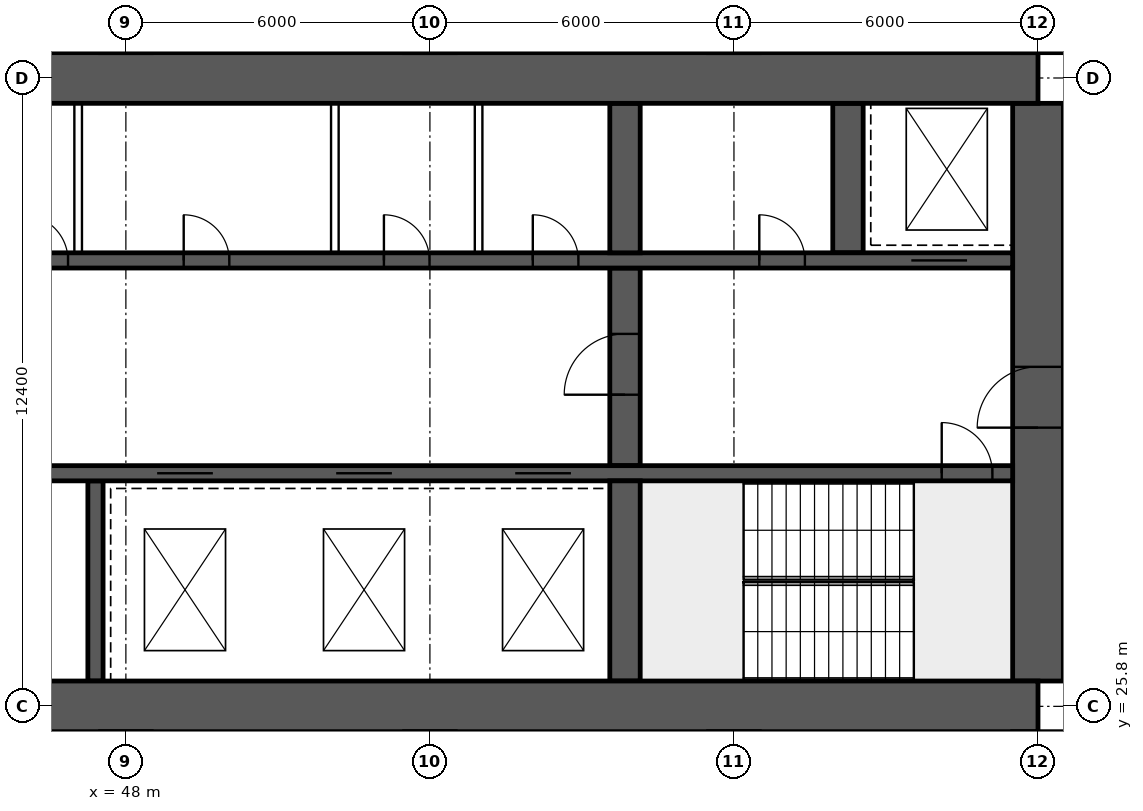
"""IFC4 building model, lengths in metres.
Left out: names, types, materials, properties, quantities, classifications, styles, units other than length and angle.
Written with IfcOpenShell. Run it as: python <this file> out.ifc"""

import sys

from ifc_helpers import new_model, si_unit, direction, frame, frame_2d, origin, place, context, subcontext, project, spatial, rectangle, extrude, element, fill, save


model = new_model("IFC4")
c1 = context("Model", 3, precision=1e-05, world=origin(), true_north=direction((0.0, 1.0)))
c2 = subcontext(c1, "Body", "Model", "MODEL_VIEW")
j1 = project(units=[si_unit("LENGTHUNIT", "METRE"), si_unit("PLANEANGLEUNIT", "RADIAN")], contexts=[c1])
p1 = place(None, origin())
s1 = spatial("IfcSite", under=j1, at=p1, CompositionType="ELEMENT")
p2 = place(p1, origin())
s2 = spatial("IfcBuilding", under=s1, at=p2, CompositionType="ELEMENT")
p3 = place(p2, frame((0.0, 0.0, -9.0)))
s3 = spatial("IfcBuildingStorey", under=s2, at=p3, CompositionType="ELEMENT", Elevation=-9.0)
for number, where, z_axis, x_axis in (
    (1, (18.0, 25.8, 0.0), (0.0, 0.0, 1.0), (1.0, 0.0, 0.0)),
    (2, (18.0, 38.2, 0.0), (0.0, 0.0, 1.0), (1.0, 0.0, 0.0)),
):
    element("IfcWall", number, at=place(p3, frame(where, z_axis=z_axis, x_axis=x_axis)), inside=s3, PredefinedType="SHEAR", context=c2, shape_type="SweptSolid", body=[
        extrude(rectangle(XDim=48.0, YDim=1.0, at=frame_2d((24.0, 0.0))), origin(), (0.0, 0.0, 1.0), 4.5),
    ])
p4 = place(p3, frame((66.0, 26.3, 0.0), z_axis=(0.0, 0.0, 1.0), x_axis=(0.0, 1.0, 0.0)))
e3 = element("IfcWall", 3, at=p4, inside=s3, PredefinedType="SHEAR", context=c2, shape_type="SweptSolid", body=[
    extrude(rectangle(XDim=11.4, YDim=1.0, at=frame_2d((5.7, 0.0))), origin(), (0.0, 0.0, 1.0), 4.5),
])
p5 = place(p4, frame((5.0, 0.0, 0.0)))
e4 = element("IfcOpeningElement", 4, at=p5, cuts=e3, PredefinedType="OPENING", context=c2, shape_type="SweptSolid", body=[
    extrude(rectangle(XDim=1.2, YDim=2.1, at=frame_2d((0.6, 1.05))), frame((0.0, 0.51, 0.0), z_axis=(0.0, -1.0, 0.0), x_axis=(1.0, 0.0, 0.0)), (0.0, 0.0, 1.0), 1.02),
])
p6 = place(p3, frame((18.5, 30.4, 0.0), z_axis=(0.0, 0.0, 1.0), x_axis=(1.0, 0.0, 0.0)))
e5 = element("IfcWall", 5, at=p6, inside=s3, PredefinedType="SHEAR", context=c2, shape_type="SweptSolid", body=[
    extrude(rectangle(XDim=47.0, YDim=0.3, at=frame_2d((23.5, 0.0))), origin(), (0.0, 0.0, 1.0), 4.5),
])
p7 = place(p6, frame((0.4, 0.0, 0.0)))
e6 = element("IfcOpeningElement", 6, at=p7, cuts=e5, PredefinedType="OPENING", context=c2, shape_type="SweptSolid", body=[
    extrude(rectangle(XDim=1.0, YDim=2.1, at=frame_2d((0.5, 1.05))), frame((0.0, 0.16, 0.0), z_axis=(0.0, -1.0, 0.0), x_axis=(1.0, 0.0, 0.0)), (0.0, 0.0, 1.0), 0.32),
])
p8 = place(p6, frame((45.6, 0.0, 0.0)))
e7 = element("IfcOpeningElement", 7, at=p8, cuts=e5, PredefinedType="OPENING", context=c2, shape_type="SweptSolid", body=[
    extrude(rectangle(XDim=1.0, YDim=2.1, at=frame_2d((0.5, 1.05))), frame((0.0, 0.16, 0.0), z_axis=(0.0, -1.0, 0.0), x_axis=(1.0, 0.0, 0.0)), (0.0, 0.0, 1.0), 0.32),
])
p9 = place(p6, frame((8.35, 0.0, 0.0)))
e8 = element("IfcOpeningElement", 8, at=p9, cuts=e5, PredefinedType="OPENING", context=c2, shape_type="SweptSolid", body=[
    extrude(rectangle(XDim=0.9, YDim=2.1, at=frame_2d((0.45, 1.05))), frame((0.0, 0.16, 0.0), z_axis=(0.0, -1.0, 0.0), x_axis=(1.0, 0.0, 0.0)), (0.0, 0.0, 1.0), 0.32),
])
p10 = place(p6, frame((13.55, 0.0, 0.0)))
e9 = element("IfcOpeningElement", 9, at=p10, cuts=e5, PredefinedType="OPENING", context=c2, shape_type="SweptSolid", body=[
    extrude(rectangle(XDim=0.9, YDim=2.1, at=frame_2d((0.45, 1.05))), frame((0.0, 0.16, 0.0), z_axis=(0.0, -1.0, 0.0), x_axis=(1.0, 0.0, 0.0)), (0.0, 0.0, 1.0), 0.32),
])
p11 = place(p6, frame((18.825, 0.0, 0.0)))
e10 = element("IfcOpeningElement", 10, at=p11, cuts=e5, PredefinedType="OPENING", context=c2, shape_type="SweptSolid", body=[
    extrude(rectangle(XDim=0.9, YDim=2.1, at=frame_2d((0.45, 1.05))), frame((0.0, 0.16, 0.0), z_axis=(0.0, -1.0, 0.0), x_axis=(1.0, 0.0, 0.0)), (0.0, 0.0, 1.0), 0.32),
])
p12 = place(p6, frame((24.325, 0.0, 0.0)))
e11 = element("IfcOpeningElement", 11, at=p12, cuts=e5, PredefinedType="OPENING", context=c2, shape_type="SweptSolid", body=[
    extrude(rectangle(XDim=0.9, YDim=2.1, at=frame_2d((0.45, 1.05))), frame((0.0, 0.16, 0.0), z_axis=(0.0, -1.0, 0.0), x_axis=(1.0, 0.0, 0.0)), (0.0, 0.0, 1.0), 0.32),
])
p13 = place(p6, frame((30.117, 0.0, 0.0)))
e12 = element("IfcOpeningElement", 12, at=p13, cuts=e5, PredefinedType="OPENING", context=c2, shape_type="SweptSolid", body=[
    extrude(rectangle(XDim=1.1, YDim=2.1, at=frame_2d((0.55, 1.05))), frame((0.0, 0.16, 0.0), z_axis=(0.0, -1.0, 0.0), x_axis=(1.0, 0.0, 0.0)), (0.0, 0.0, 1.0), 0.32),
])
p14 = place(p6, frame((33.65, 0.0, 0.0)))
e13 = element("IfcOpeningElement", 13, at=p14, cuts=e5, PredefinedType="OPENING", context=c2, shape_type="SweptSolid", body=[
    extrude(rectangle(XDim=1.1, YDim=2.1, at=frame_2d((0.55, 1.05))), frame((0.0, 0.16, 0.0), z_axis=(0.0, -1.0, 0.0), x_axis=(1.0, 0.0, 0.0)), (0.0, 0.0, 1.0), 0.32),
])
p15 = place(p6, frame((37.183, 0.0, 0.0)))
e14 = element("IfcOpeningElement", 14, at=p15, cuts=e5, PredefinedType="OPENING", context=c2, shape_type="SweptSolid", body=[
    extrude(rectangle(XDim=1.1, YDim=2.1, at=frame_2d((0.55, 1.05))), frame((0.0, 0.16, 0.0), z_axis=(0.0, -1.0, 0.0), x_axis=(1.0, 0.0, 0.0)), (0.0, 0.0, 1.0), 0.32),
])
p16 = place(p3, frame((18.5, 34.6, 0.0), z_axis=(0.0, 0.0, 1.0), x_axis=(1.0, 0.0, 0.0)))
e15 = element("IfcWall", 15, at=p16, inside=s3, PredefinedType="SHEAR", context=c2, shape_type="SweptSolid", body=[
    extrude(rectangle(XDim=47.0, YDim=0.3, at=frame_2d((23.5, 0.0))), origin(), (0.0, 0.0, 1.0), 4.5),
])
p17 = place(p16, frame((0.9, 0.0, 0.0)))
e16 = element("IfcOpeningElement", 16, at=p17, cuts=e15, PredefinedType="OPENING", context=c2, shape_type="SweptSolid", body=[
    extrude(rectangle(XDim=1.1, YDim=2.1, at=frame_2d((0.55, 1.05))), frame((0.0, 0.16, 0.0), z_axis=(0.0, -1.0, 0.0), x_axis=(1.0, 0.0, 0.0)), (0.0, 0.0, 1.0), 0.32),
])
p18 = place(p16, frame((45.0, 0.0, 0.0)))
e17 = element("IfcOpeningElement", 17, at=p18, cuts=e15, PredefinedType="OPENING", context=c2, shape_type="SweptSolid", body=[
    extrude(rectangle(XDim=1.1, YDim=2.1, at=frame_2d((0.55, 1.05))), frame((0.0, 0.16, 0.0), z_axis=(0.0, -1.0, 0.0), x_axis=(1.0, 0.0, 0.0)), (0.0, 0.0, 1.0), 0.32),
])
p19 = place(p16, frame((4.1, 0.0, 0.0)))
e18 = element("IfcOpeningElement", 18, at=p19, cuts=e15, PredefinedType="OPENING", context=c2, shape_type="SweptSolid", body=[
    extrude(rectangle(XDim=0.9, YDim=2.1, at=frame_2d((0.45, 1.05))), frame((0.0, 0.16, 0.0), z_axis=(0.0, -1.0, 0.0), x_axis=(1.0, 0.0, 0.0)), (0.0, 0.0, 1.0), 0.32),
])
p20 = place(p16, frame((42.0, 0.0, 0.0)))
e19 = element("IfcOpeningElement", 19, at=p20, cuts=e15, PredefinedType="OPENING", context=c2, shape_type="SweptSolid", body=[
    extrude(rectangle(XDim=0.9, YDim=2.1, at=frame_2d((0.45, 1.05))), frame((0.0, 0.16, 0.0), z_axis=(0.0, -1.0, 0.0), x_axis=(1.0, 0.0, 0.0)), (0.0, 0.0, 1.0), 0.32),
])
p21 = place(p16, frame((8.875, 0.0, 0.0)))
e20 = element("IfcOpeningElement", 20, at=p21, cuts=e15, PredefinedType="OPENING", context=c2, shape_type="SweptSolid", body=[
    extrude(rectangle(XDim=0.9, YDim=2.1, at=frame_2d((0.45, 1.05))), frame((0.0, 0.16, 0.0), z_axis=(0.0, -1.0, 0.0), x_axis=(1.0, 0.0, 0.0)), (0.0, 0.0, 1.0), 0.32),
])
p22 = place(p16, frame((12.849, 0.0, 0.0)))
e21 = element("IfcOpeningElement", 21, at=p22, cuts=e15, PredefinedType="OPENING", context=c2, shape_type="SweptSolid", body=[
    extrude(rectangle(XDim=0.9, YDim=2.1, at=frame_2d((0.45, 1.05))), frame((0.0, 0.16, 0.0), z_axis=(0.0, -1.0, 0.0), x_axis=(1.0, 0.0, 0.0)), (0.0, 0.0, 1.0), 0.32),
])
p23 = place(p16, frame((16.496, 0.0, 0.0)))
e22 = element("IfcOpeningElement", 22, at=p23, cuts=e15, PredefinedType="OPENING", context=c2, shape_type="SweptSolid", body=[
    extrude(rectangle(XDim=0.9, YDim=2.1, at=frame_2d((0.45, 1.05))), frame((0.0, 0.16, 0.0), z_axis=(0.0, -1.0, 0.0), x_axis=(1.0, 0.0, 0.0)), (0.0, 0.0, 1.0), 0.32),
])
p24 = place(p16, frame((20.255, 0.0, 0.0)))
e23 = element("IfcOpeningElement", 23, at=p24, cuts=e15, PredefinedType="OPENING", context=c2, shape_type="SweptSolid", body=[
    extrude(rectangle(XDim=0.9, YDim=2.1, at=frame_2d((0.45, 1.05))), frame((0.0, 0.16, 0.0), z_axis=(0.0, -1.0, 0.0), x_axis=(1.0, 0.0, 0.0)), (0.0, 0.0, 1.0), 0.32),
])
p25 = place(p16, frame((24.661, 0.0, 0.0)))
e24 = element("IfcOpeningElement", 24, at=p25, cuts=e15, PredefinedType="OPENING", context=c2, shape_type="SweptSolid", body=[
    extrude(rectangle(XDim=0.9, YDim=2.1, at=frame_2d((0.45, 1.05))), frame((0.0, 0.16, 0.0), z_axis=(0.0, -1.0, 0.0), x_axis=(1.0, 0.0, 0.0)), (0.0, 0.0, 1.0), 0.32),
])
p26 = place(p16, frame((27.458, 0.0, 0.0)))
e25 = element("IfcOpeningElement", 25, at=p26, cuts=e15, PredefinedType="OPENING", context=c2, shape_type="SweptSolid", body=[
    extrude(rectangle(XDim=0.9, YDim=2.1, at=frame_2d((0.45, 1.05))), frame((0.0, 0.16, 0.0), z_axis=(0.0, -1.0, 0.0), x_axis=(1.0, 0.0, 0.0)), (0.0, 0.0, 1.0), 0.32),
])
p27 = place(p16, frame((30.641, 0.0, 0.0)))
e26 = element("IfcOpeningElement", 26, at=p27, cuts=e15, PredefinedType="OPENING", context=c2, shape_type="SweptSolid", body=[
    extrude(rectangle(XDim=0.9, YDim=2.1, at=frame_2d((0.45, 1.05))), frame((0.0, 0.16, 0.0), z_axis=(0.0, -1.0, 0.0), x_axis=(1.0, 0.0, 0.0)), (0.0, 0.0, 1.0), 0.32),
])
p28 = place(p16, frame((34.592, 0.0, 0.0)))
e27 = element("IfcOpeningElement", 27, at=p28, cuts=e15, PredefinedType="OPENING", context=c2, shape_type="SweptSolid", body=[
    extrude(rectangle(XDim=0.9, YDim=2.1, at=frame_2d((0.45, 1.05))), frame((0.0, 0.16, 0.0), z_axis=(0.0, -1.0, 0.0), x_axis=(1.0, 0.0, 0.0)), (0.0, 0.0, 1.0), 0.32),
])
p29 = place(p16, frame((37.53, 0.0, 0.0)))
e28 = element("IfcOpeningElement", 28, at=p29, cuts=e15, PredefinedType="OPENING", context=c2, shape_type="SweptSolid", body=[
    extrude(rectangle(XDim=0.9, YDim=2.1, at=frame_2d((0.45, 1.05))), frame((0.0, 0.16, 0.0), z_axis=(0.0, -1.0, 0.0), x_axis=(1.0, 0.0, 0.0)), (0.0, 0.0, 1.0), 0.32),
])
p30 = place(p3, frame((57.85, 26.3, 0.0), z_axis=(0.0, 0.0, 1.0), x_axis=(0.0, 1.0, 0.0)))
e29 = element("IfcWall", 29, at=p30, inside=s3, PredefinedType="SHEAR", context=c2, shape_type="SweptSolid", body=[
    extrude(rectangle(XDim=3.95, YDim=0.6, at=frame_2d((1.975, 0.0))), origin(), (0.0, 0.0, 1.0), 4.5),
])
p31 = place(p3, frame((57.85, 30.55, 0.0), z_axis=(0.0, 0.0, 1.0), x_axis=(0.0, 1.0, 0.0)))
e30 = element("IfcWall", 30, at=p31, inside=s3, PredefinedType="SHEAR", context=c2, shape_type="SweptSolid", body=[
    extrude(rectangle(XDim=3.9, YDim=0.6, at=frame_2d((1.95, 0.0))), origin(), (0.0, 0.0, 1.0), 4.5),
])
p32 = place(p31, frame((1.4, 0.0, 0.0)))
e31 = element("IfcOpeningElement", 31, at=p32, cuts=e30, PredefinedType="OPENING", context=c2, shape_type="SweptSolid", body=[
    extrude(rectangle(XDim=1.2, YDim=2.1, at=frame_2d((0.6, 1.05))), frame((0.0, 0.31, 0.0), z_axis=(0.0, -1.0, 0.0), x_axis=(1.0, 0.0, 0.0)), (0.0, 0.0, 1.0), 0.62),
])
for number, where, z_axis, x_axis in (
    (32, (62.25, 34.75, 0.0), (0.0, 0.0, 1.0), (0.0, 1.0, 0.0)),
    (33, (57.85, 34.75, 0.0), (0.0, 0.0, 1.0), (0.0, 1.0, 0.0)),
):
    element("IfcWall", number, at=place(p3, frame(where, z_axis=z_axis, x_axis=x_axis)), inside=s3, PredefinedType="SHEAR", context=c2, shape_type="SweptSolid", body=[
        extrude(rectangle(XDim=2.95, YDim=0.6, at=frame_2d((1.475, 0.0))), origin(), (0.0, 0.0, 1.0), 4.5),
    ])
p33 = place(p3, frame((47.4, 26.3, 0.0), z_axis=(0.0, 0.0, 1.0), x_axis=(0.0, 1.0, 0.0)))
e34 = element("IfcWall", 34, at=p33, inside=s3, PredefinedType="SHEAR", context=c2, shape_type="SweptSolid", body=[
    extrude(rectangle(XDim=3.95, YDim=0.3, at=frame_2d((1.975, 0.0))), origin(), (0.0, 0.0, 1.0), 4.5),
])
for number, where, z_axis, x_axis in (
    (35, (47.058, 34.75, 0.0), (0.0, 0.0, 1.0), (0.0, 1.0, 0.0)),
    (36, (52.124, 34.75, 0.0), (0.0, 0.0, 1.0), (0.0, 1.0, 0.0)),
    (37, (54.961, 34.75, 0.0), (0.0, 0.0, 1.0), (0.0, 1.0, 0.0)),
):
    element("IfcWall", number, at=place(p3, frame(where, z_axis=z_axis, x_axis=x_axis)), inside=s3, PredefinedType="SOLIDWALL", context=c2, shape_type="SweptSolid", body=[
        extrude(rectangle(XDim=2.95, YDim=0.15, at=frame_2d((1.475, 0.0))), origin(), (0.0, 0.0, 1.0), 4.2),
    ])
p34 = place(p5, origin())
e38 = element("IfcDoor", 38, at=p34, inside=s3, OperationType="SINGLE_SWING_LEFT", PredefinedType="DOOR", context=c2, shape_type="SweptSolid", body=[
    extrude(rectangle(XDim=1.2, YDim=2.1, at=frame_2d((0.6, 1.05))), frame((0.0, 0.025, 0.0), z_axis=(0.0, -1.0, 0.0), x_axis=(1.0, 0.0, 0.0)), (0.0, 0.0, 1.0), 0.05),
])
fill(e4, e38)
p35 = place(p8, origin())
e39 = element("IfcDoor", 39, at=p35, inside=s3, OperationType="SINGLE_SWING_LEFT", PredefinedType="DOOR", context=c2, shape_type="SweptSolid", body=[
    extrude(rectangle(XDim=1.0, YDim=2.1, at=frame_2d((0.5, 1.05))), frame((0.0, 0.025, 0.0), z_axis=(0.0, -1.0, 0.0), x_axis=(1.0, 0.0, 0.0)), (0.0, 0.0, 1.0), 0.05),
])
fill(e7, e39)
p36 = place(p18, origin())
e40 = element("IfcDoor", 40, at=p36, inside=s3, OperationType="DOUBLE_DOOR_SLIDING", PredefinedType="DOOR", context=c2, shape_type="SweptSolid", body=[
    extrude(rectangle(XDim=1.1, YDim=2.1, at=frame_2d((0.55, 1.05))), frame((0.0, 0.025, 0.0), z_axis=(0.0, -1.0, 0.0), x_axis=(1.0, 0.0, 0.0)), (0.0, 0.0, 1.0), 0.05),
])
fill(e17, e40)
p37 = place(p20, origin())
e41 = element("IfcDoor", 41, at=p37, inside=s3, OperationType="SINGLE_SWING_LEFT", PredefinedType="DOOR", context=c2, shape_type="SweptSolid", body=[
    extrude(rectangle(XDim=0.9, YDim=2.1, at=frame_2d((0.45, 1.05))), frame((0.0, 0.025, 0.0), z_axis=(0.0, -1.0, 0.0), x_axis=(1.0, 0.0, 0.0)), (0.0, 0.0, 1.0), 0.05),
])
fill(e19, e41)
p38 = place(p32, origin())
e42 = element("IfcDoor", 42, at=p38, inside=s3, OperationType="SINGLE_SWING_LEFT", PredefinedType="DOOR", context=c2, shape_type="SweptSolid", body=[
    extrude(rectangle(XDim=1.2, YDim=2.1, at=frame_2d((0.6, 1.05))), frame((0.0, 0.025, 0.0), z_axis=(0.0, -1.0, 0.0), x_axis=(1.0, 0.0, 0.0)), (0.0, 0.0, 1.0), 0.05),
])
fill(e31, e42)
p39 = place(p26, origin())
e43 = element("IfcDoor", 43, at=p39, inside=s3, OperationType="SINGLE_SWING_LEFT", PredefinedType="DOOR", context=c2, shape_type="SweptSolid", body=[
    extrude(rectangle(XDim=0.9, YDim=2.1, at=frame_2d((0.45, 1.05))), frame((0.0, 0.025, 0.0), z_axis=(0.0, -1.0, 0.0), x_axis=(1.0, 0.0, 0.0)), (0.0, 0.0, 1.0), 0.05),
])
fill(e25, e43)
p40 = place(p27, origin())
e44 = element("IfcDoor", 44, at=p40, inside=s3, OperationType="SINGLE_SWING_LEFT", PredefinedType="DOOR", context=c2, shape_type="SweptSolid", body=[
    extrude(rectangle(XDim=0.9, YDim=2.1, at=frame_2d((0.45, 1.05))), frame((0.0, 0.025, 0.0), z_axis=(0.0, -1.0, 0.0), x_axis=(1.0, 0.0, 0.0)), (0.0, 0.0, 1.0), 0.05),
])
fill(e26, e44)
p41 = place(p28, origin())
e45 = element("IfcDoor", 45, at=p41, inside=s3, OperationType="SINGLE_SWING_LEFT", PredefinedType="DOOR", context=c2, shape_type="SweptSolid", body=[
    extrude(rectangle(XDim=0.9, YDim=2.1, at=frame_2d((0.45, 1.05))), frame((0.0, 0.025, 0.0), z_axis=(0.0, -1.0, 0.0), x_axis=(1.0, 0.0, 0.0)), (0.0, 0.0, 1.0), 0.05),
])
fill(e27, e45)
p42 = place(p29, origin())
e46 = element("IfcDoor", 46, at=p42, inside=s3, OperationType="SINGLE_SWING_LEFT", PredefinedType="DOOR", context=c2, shape_type="SweptSolid", body=[
    extrude(rectangle(XDim=0.9, YDim=2.1, at=frame_2d((0.45, 1.05))), frame((0.0, 0.025, 0.0), z_axis=(0.0, -1.0, 0.0), x_axis=(1.0, 0.0, 0.0)), (0.0, 0.0, 1.0), 0.05),
])
fill(e28, e46)
p43 = place(p13, origin())
e47 = element("IfcDoor", 47, at=p43, inside=s3, OperationType="DOUBLE_DOOR_SLIDING", PredefinedType="DOOR", context=c2, shape_type="SweptSolid", body=[
    extrude(rectangle(XDim=1.1, YDim=2.1, at=frame_2d((0.55, 1.05))), frame((0.0, 0.025, 0.0), z_axis=(0.0, -1.0, 0.0), x_axis=(1.0, 0.0, 0.0)), (0.0, 0.0, 1.0), 0.05),
])
fill(e12, e47)
p44 = place(p14, origin())
e48 = element("IfcDoor", 48, at=p44, inside=s3, OperationType="DOUBLE_DOOR_SLIDING", PredefinedType="DOOR", context=c2, shape_type="SweptSolid", body=[
    extrude(rectangle(XDim=1.1, YDim=2.1, at=frame_2d((0.55, 1.05))), frame((0.0, 0.025, 0.0), z_axis=(0.0, -1.0, 0.0), x_axis=(1.0, 0.0, 0.0)), (0.0, 0.0, 1.0), 0.05),
])
fill(e13, e48)
p45 = place(p15, origin())
e49 = element("IfcDoor", 49, at=p45, inside=s3, OperationType="DOUBLE_DOOR_SLIDING", PredefinedType="DOOR", context=c2, shape_type="SweptSolid", body=[
    extrude(rectangle(XDim=1.1, YDim=2.1, at=frame_2d((0.55, 1.05))), frame((0.0, 0.025, 0.0), z_axis=(0.0, -1.0, 0.0), x_axis=(1.0, 0.0, 0.0)), (0.0, 0.0, 1.0), 0.05),
])
fill(e14, e49)
save(model, sys.argv[1])
